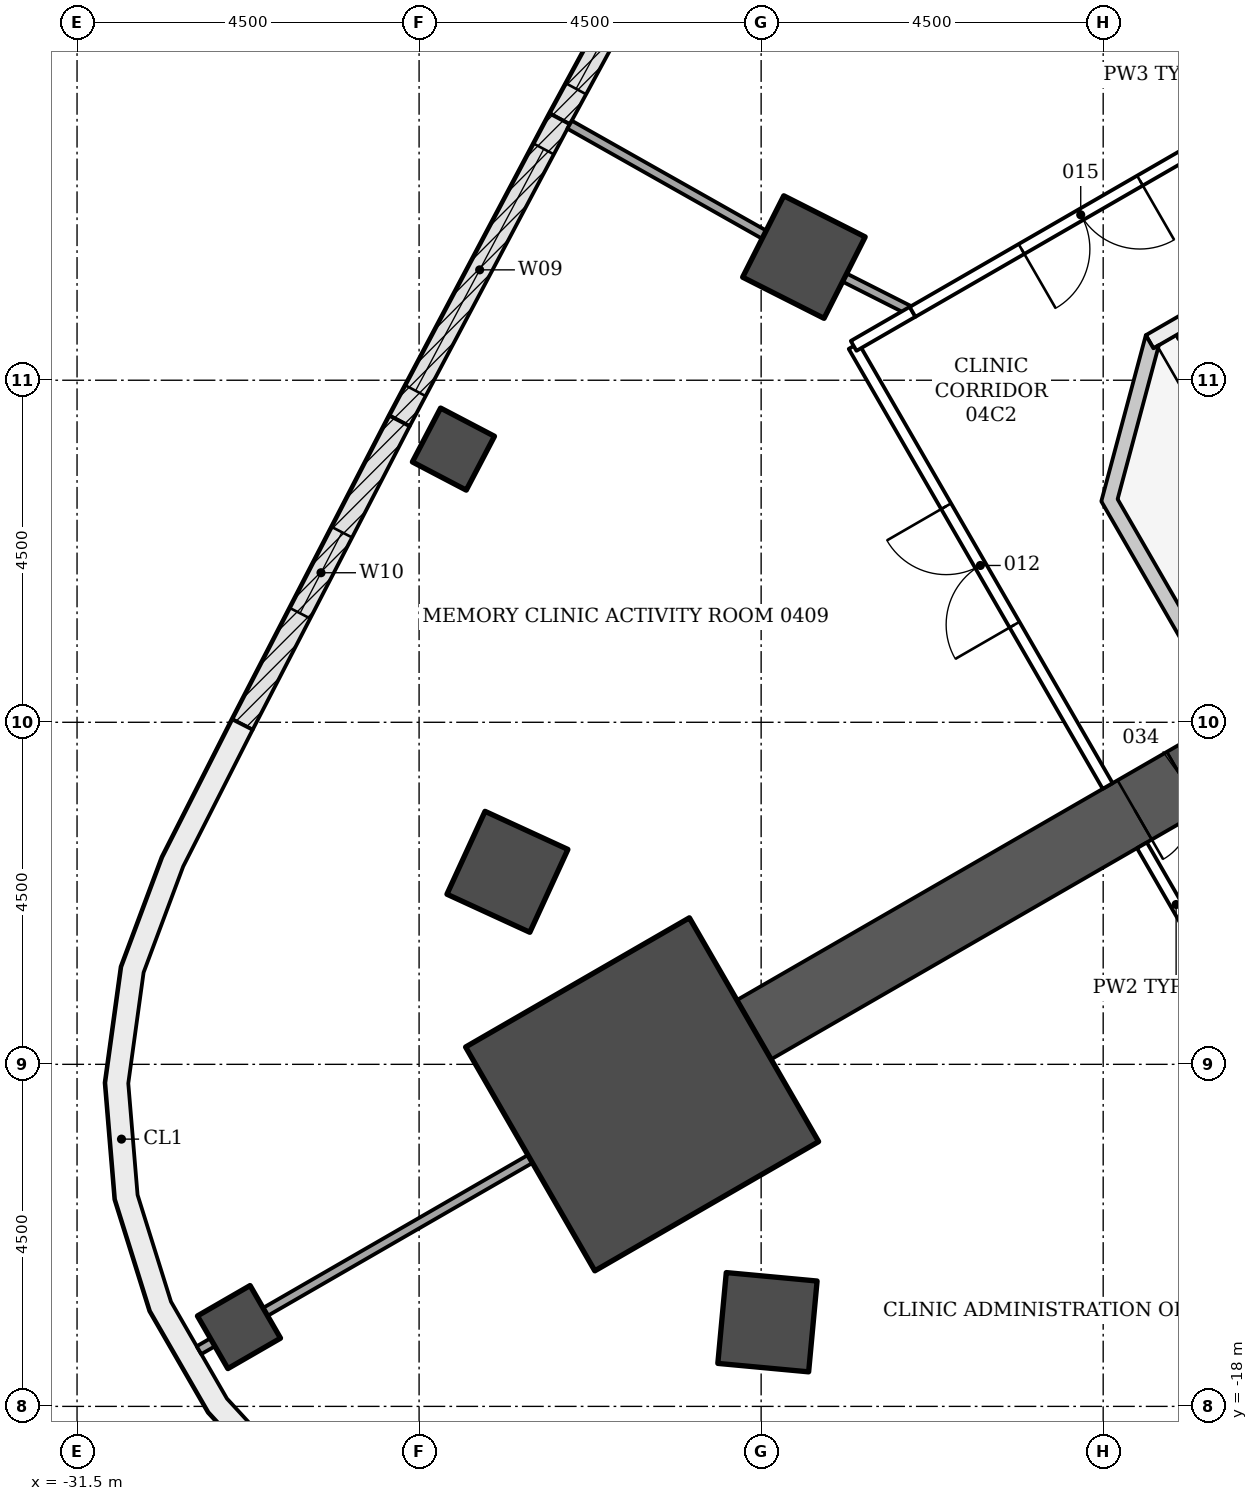
"""IFC4 building model, lengths in metres.
Left out: names, types, materials, properties, quantities, classifications, styles, units other than length and angle.
Written with IfcOpenShell. Run it as: python <this file> out.ifc"""

import sys

from ifc_helpers import new_model, si_unit, direction, frame, frame_2d, origin, origin_2d, place, context, subcontext, project, spatial, polyline, rectangle, outline, extrude, element, fill, save


model = new_model("IFC4")
c1 = context("Model", 3, precision=1e-05, world=origin(), true_north=direction((0.0, 1.0)))
c2 = subcontext(c1, "Body", "Model", "MODEL_VIEW")
j1 = project(units=[si_unit("LENGTHUNIT", "METRE"), si_unit("PLANEANGLEUNIT", "RADIAN")], contexts=[c1])
p1 = place(None, origin())
s1 = spatial("IfcSite", under=j1, at=p1, CompositionType="ELEMENT")
p2 = place(p1, origin())
s2 = spatial("IfcBuilding", under=s1, at=p2, CompositionType="ELEMENT")
p3 = place(p2, frame((0.0, 0.0, 19.5)))
s3 = spatial("IfcBuildingStorey", under=s2, at=p3, CompositionType="ELEMENT", Elevation=19.5)
for number, where, z_axis, x_axis in (
    (1, (-21.937, -2.88, -0.25), (0.0, 0.0, 1.0), (-0.893, 0.451, 0.0)),
    (2, (-25.838, -10.967, -0.25), (0.0, 0.0, 1.0), (-0.909, 0.418, 0.0)),
    (3, (-22.417, -16.893, -0.25), (0.0, 0.0, 1.0), (-0.093, -0.996, 0.0)),
):
    element("IfcColumn", number, at=place(p3, frame(where, z_axis=z_axis, x_axis=x_axis)), inside=s3, PredefinedType="COLUMN", context=c2, shape_type="SweptSolid", body=[
        extrude(rectangle(XDim=1.2, YDim=1.2, at=origin_2d()), origin(), (0.0, 0.0, 1.0), 4.55),
    ])
for number, where, z_axis, x_axis in (
    (4, (-26.548, -5.406, -0.25), (0.0, 0.0, 1.0), (-0.886, 0.464, 0.0)),
    (5, (-29.37, -16.957, -0.25), (0.0, 0.0, 1.0), (-0.866, -0.5, 0.0)),
):
    element("IfcColumn", number, at=place(p3, frame(where, z_axis=z_axis, x_axis=x_axis)), inside=s3, PredefinedType="COLUMN", context=c2, shape_type="SweptSolid", body=[
        extrude(rectangle(XDim=0.8, YDim=0.8, at=origin_2d()), origin(), (0.0, 0.0, 1.0), 4.55),
    ])
p4 = place(p3, frame((-9.922, -5.728, -0.25), z_axis=(0.0, 0.0, 1.0), x_axis=(-0.866028046028, -0.499995423472, 0.0)))
e6 = element("IfcWall", 6, at=p4, inside=s3, PredefinedType="SHEAR", context=c2, shape_type="SweptSolid", body=[
    extrude(rectangle(XDim=14.633, YDim=0.9, at=frame_2d((7.316, 0.0))), origin(), (0.0, 0.0, 1.0), 4.55),
])
p5 = place(p4, frame((7.35, 0.0, 0.25)))
e7 = element("IfcOpeningElement", 7, at=p5, cuts=e6, PredefinedType="OPENING", context=c2, shape_type="SweptSolid", body=[
    extrude(rectangle(XDim=1.5, YDim=2.1, at=frame_2d((0.75, 1.05))), frame((0.0, 0.46, 0.0), z_axis=(0.0, -1.0, 0.0), x_axis=(1.0, 0.0, 0.0)), (0.0, 0.0, 1.0), 0.92),
])
p6 = place(p3, frame((-24.066, -13.895, -0.25), z_axis=(0.0, 0.0, 1.0), x_axis=(-0.866025403784, -0.5, 0.0)))
e8 = element("IfcColumn", 8, at=p6, inside=s3, PredefinedType="COLUMN", context=c2, shape_type="SweptSolid", body=[
    extrude(rectangle(XDim=3.4, YDim=3.4, at=origin_2d()), origin(), (0.0, 0.0, 1.0), 4.55),
])
p7 = place(p3, frame((-25.148, -1.06, 0.0), z_axis=(0.0, 0.0, 1.0), x_axis=(0.477577109439, 0.878589838628, 0.0)))
e9 = element("IfcWall", 9, at=p7, inside=s3, PredefinedType="NOTDEFINED", context=c2, shape_type="SweptSolid", body=[
    extrude(rectangle(XDim=4.496, YDim=0.3, at=frame_2d((2.248, 0.0))), origin(), (0.0, 0.0, 1.0), 4.3),
])
p8 = place(p7, frame((0.448, 0.0, 1.5)))
e10 = element("IfcOpeningElement", 10, at=p8, cuts=e9, PredefinedType="OPENING", context=c2, shape_type="SweptSolid", body=[
    extrude(rectangle(XDim=3.6, YDim=1.8, at=frame_2d((1.8, 0.9))), frame((0.0, 0.16, 0.0), z_axis=(0.0, -1.0, 0.0), x_axis=(1.0, 0.0, 0.0)), (0.0, 0.0, 1.0), 0.32),
])
p9 = place(p3, frame((-27.256, -5.034, 0.0), z_axis=(0.0, 0.0, 1.0), x_axis=(0.468566202388, 0.883428386447, 0.0)))
e11 = element("IfcWall", 11, at=p9, inside=s3, PredefinedType="NOTDEFINED", context=c2, shape_type="SweptSolid", body=[
    extrude(rectangle(XDim=4.496, YDim=0.3, at=frame_2d((2.248, 0.0))), origin(), (0.0, 0.0, 1.0), 4.3),
])
p10 = place(p9, frame((0.448, 0.0, 1.5)))
e12 = element("IfcOpeningElement", 12, at=p10, cuts=e11, PredefinedType="OPENING", context=c2, shape_type="SweptSolid", body=[
    extrude(rectangle(XDim=3.6, YDim=1.8, at=frame_2d((1.8, 0.9))), frame((0.0, 0.16, 0.0), z_axis=(0.0, -1.0, 0.0), x_axis=(1.0, 0.0, 0.0)), (0.0, 0.0, 1.0), 0.32),
])
p11 = place(p3, frame((-29.323, -9.029, 0.0), z_axis=(0.0, 0.0, 1.0), x_axis=(0.459443600121, 0.888206945654, 0.0)))
e13 = element("IfcWall", 13, at=p11, inside=s3, PredefinedType="NOTDEFINED", context=c2, shape_type="SweptSolid", body=[
    extrude(rectangle(XDim=4.496, YDim=0.3, at=frame_2d((2.248, 0.0))), origin(), (0.0, 0.0, 1.0), 4.3),
])
p12 = place(p11, frame((1.648, 0.0, 0.8)))
e14 = element("IfcOpeningElement", 14, at=p12, cuts=e13, PredefinedType="OPENING", context=c2, shape_type="SweptSolid", body=[
    extrude(rectangle(XDim=1.2, YDim=3.0, at=frame_2d((0.6, 1.5))), frame((0.0, 0.16, 0.0), z_axis=(0.0, -1.0, 0.0), x_axis=(1.0, 0.0, 0.0)), (0.0, 0.0, 1.0), 0.32),
])
p13 = place(p3, origin())
e15 = element("IfcWall", 15, at=p13, inside=s3, PredefinedType="NOTDEFINED", context=c2, shape_type="SweptSolid", body=[
    extrude(outline(polyline([(-29.457, -8.962), (-30.379, -10.776), (-30.917, -12.218), (-31.128, -13.742), (-31.0, -15.276), (-30.54, -16.744), (-29.771, -18.077), (-28.729, -19.209), (-27.465, -20.086), (-26.04, -20.666), (-24.522, -20.921), (-22.49, -21.03), (-22.474, -20.73), (-24.489, -20.622), (-25.957, -20.376), (-27.321, -19.821), (-28.531, -18.981), (-29.528, -17.898), (-30.264, -16.623), (-30.704, -15.218), (-30.826, -13.75), (-30.625, -12.292), (-30.104, -10.897), (-29.19, -9.098), (-29.457, -8.962)])), origin(), (0.0, 0.0, 1.0), 4.3),
])
p14 = place(p3, frame((-12.539, -1.194, -0.25), z_axis=(0.0, 0.0, 1.0), x_axis=(-0.866045472092, -0.499965239061, 0.0)))
e16 = element("IfcWall", 16, at=p14, inside=s3, PredefinedType="SHEAR", context=c2, shape_type="SweptSolid", body=[
    extrude(rectangle(XDim=5.6, YDim=0.2, at=frame_2d((2.8, 0.0))), origin(), (0.0, 0.0, 1.0), 4.55),
])
p15 = place(p14, frame((0.45, 0.0, 0.25)))
e17 = element("IfcOpeningElement", 17, at=p15, cuts=e16, PredefinedType="OPENING", context=c2, shape_type="SweptSolid", body=[
    extrude(rectangle(XDim=1.2, YDim=2.1, at=frame_2d((0.6, 1.05))), frame((0.0, 0.11, 0.0), z_axis=(0.0, -1.0, 0.0), x_axis=(1.0, 0.0, 0.0)), (0.0, 0.0, 1.0), 0.22),
])
p16 = place(p3, frame((0.0, 0.0, -0.25)))
e18 = element("IfcWall", 18, at=p16, inside=s3, PredefinedType="SHEAR", context=c2, shape_type="SweptSolid", body=[
    extrude(outline(polyline([(-17.439, -3.907), (-18.025, -6.093), (-16.95, -7.955), (-16.777, -7.855), (-17.81, -6.065), (-17.267, -4.039), (-17.339, -4.081), (-17.339, -4.081), (-17.339, -4.081), (-17.339, -4.081), (-17.339, -4.081), (-17.339, -4.081), (-17.339, -4.081), (-17.339, -4.081), (-17.339, -4.081), (-17.339, -4.081), (-17.339, -4.081), (-17.339, -4.081), (-17.339, -4.081), (-17.339, -4.081), (-17.339, -4.081), (-17.339, -4.081), (-17.339, -4.081), (-17.439, -3.907)])), origin(), (0.0, 0.0, 1.0), 4.55),
])
p17 = place(p3, frame((-16.591, -12.176, 0.0), z_axis=(0.0, 0.0, 1.0), x_axis=(-0.499965372359, 0.866045395139, 0.0)))
e19 = element("IfcWall", 19, at=p17, inside=s3, PredefinedType="PARTITIONING", context=c2, shape_type="SweptSolid", body=[
    extrude(rectangle(XDim=1.798, YDim=0.15, at=frame_2d((0.899, 0.0))), origin(), (0.0, 0.0, 1.0), 3.843),
])
p18 = place(p3, frame((-29.716, -17.157, 0.0), z_axis=(0.0, 0.0, 1.0), x_axis=(-0.865774595023, -0.500434162116, 0.0)))
e20 = element("IfcWall", 20, at=p18, inside=s3, PredefinedType="PARTITIONING", context=c2, shape_type="SweptSolid", body=[
    extrude(rectangle(XDim=0.208, YDim=0.12, at=frame_2d((0.104, 0.0))), origin(), (0.0, 0.0, 1.0), 4.3),
])
p19 = place(p3, frame((-25.538, -14.745, 0.0), z_axis=(0.0, 0.0, 1.0), x_axis=(-0.866027971625, -0.499995552344, 0.0)))
e21 = element("IfcWall", 21, at=p19, inside=s3, PredefinedType="PARTITIONING", context=c2, shape_type="SweptSolid", body=[
    extrude(rectangle(XDim=4.024, YDim=0.12, at=frame_2d((2.012, 0.0))), origin(), (0.0, 0.0, 1.0), 3.767),
])
p20 = place(p3, frame((-17.941, -9.838, 0.0), z_axis=(0.0, 0.0, 1.0), x_axis=(-0.500048140185, 0.865997608252, 0.0)))
e22 = element("IfcWall", 22, at=p20, inside=s3, PredefinedType="PARTITIONING", context=c2, shape_type="SweptSolid", body=[
    extrude(rectangle(XDim=6.683, YDim=0.15, at=frame_2d((3.342, 0.0))), origin(), (0.0, 0.0, 1.0), 3.843),
])
p21 = place(p20, frame((2.45, 0.0, 0.0)))
e23 = element("IfcOpeningElement", 23, at=p21, cuts=e22, PredefinedType="OPENING", context=c2, shape_type="SweptSolid", body=[
    extrude(rectangle(XDim=1.8, YDim=2.1, at=frame_2d((0.9, 1.05))), frame((0.0, 0.085, 0.0), z_axis=(0.0, -1.0, 0.0), x_axis=(1.0, 0.0, 0.0)), (0.0, 0.0, 1.0), 0.17),
])
p22 = place(p3, frame((-21.283, -4.048, 0.0), z_axis=(0.0, 0.0, 1.0), x_axis=(0.865804825377, 0.500381858538, 0.0)))
e24 = element("IfcWall", 24, at=p22, inside=s3, PredefinedType="PARTITIONING", context=c2, shape_type="SweptSolid", body=[
    extrude(rectangle(XDim=0.897, YDim=0.15, at=frame_2d((0.449, 0.0))), origin(), (0.0, 0.0, 1.0), 3.894),
])
p23 = place(p3, frame((-22.461, -2.584, 0.0), z_axis=(0.0, 0.0, 1.0), x_axis=(-0.870620069476, 0.491955988505, 0.0)))
e25 = element("IfcWall", 25, at=p23, inside=s3, PredefinedType="PARTITIONING", context=c2, shape_type="SweptSolid", body=[
    extrude(rectangle(XDim=2.939, YDim=0.12, at=frame_2d((1.47, 0.0))), origin(), (0.0, 0.0, 1.0), 3.683),
])
p24 = place(p3, frame((-20.509, -3.601, 0.0), z_axis=(0.0, 0.0, 1.0), x_axis=(-0.892316605155, 0.451410097544, 0.0)))
e26 = element("IfcWall", 26, at=p24, inside=s3, PredefinedType="PARTITIONING", context=c2, shape_type="SweptSolid", body=[
    extrude(rectangle(XDim=1.0, YDim=0.12, at=frame_2d((0.5, 0.0))), origin(), (0.0, 0.0, 1.0), 3.894),
])
p25 = place(p3, frame((-16.087, -1.049, 0.0), z_axis=(0.0, 0.0, 1.0), x_axis=(-0.866071706002, -0.49991979363, 0.0)))
e27 = element("IfcWall", 27, at=p25, inside=s3, PredefinedType="PARTITIONING", context=c2, shape_type="SweptSolid", body=[
    extrude(rectangle(XDim=5.105, YDim=0.15, at=frame_2d((2.552, 0.0))), origin(), (0.0, 0.0, 1.0), 3.894),
])
p26 = place(p25, frame((1.65, 0.0, 0.0)))
e28 = element("IfcOpeningElement", 28, at=p26, cuts=e27, PredefinedType="OPENING", context=c2, shape_type="SweptSolid", body=[
    extrude(rectangle(XDim=1.8, YDim=2.1, at=frame_2d((0.9, 1.05))), frame((0.0, 0.085, 0.0), z_axis=(0.0, -1.0, 0.0), x_axis=(1.0, 0.0, 0.0)), (0.0, 0.0, 1.0), 0.17),
])
p27 = place(p8, origin())
e29 = element("IfcWindow", 29, at=p27, inside=s3, PartitioningType="SINGLE_PANEL", PredefinedType="WINDOW", context=c2, shape_type="SweptSolid", body=[
    extrude(rectangle(XDim=3.6, YDim=1.8, at=frame_2d((1.8, 0.9))), frame((0.0, 0.03, 0.0), z_axis=(0.0, -1.0, 0.0), x_axis=(1.0, 0.0, 0.0)), (0.0, 0.0, 1.0), 0.06),
])
fill(e10, e29)
p28 = place(p10, origin())
e30 = element("IfcWindow", 30, at=p28, inside=s3, PartitioningType="SINGLE_PANEL", PredefinedType="WINDOW", context=c2, shape_type="SweptSolid", body=[
    extrude(rectangle(XDim=3.6, YDim=1.8, at=frame_2d((1.8, 0.9))), frame((0.0, 0.03, 0.0), z_axis=(0.0, -1.0, 0.0), x_axis=(1.0, 0.0, 0.0)), (0.0, 0.0, 1.0), 0.06),
])
fill(e12, e30)
p29 = place(p12, origin())
e31 = element("IfcWindow", 31, at=p29, inside=s3, PartitioningType="SINGLE_PANEL", PredefinedType="WINDOW", context=c2, shape_type="SweptSolid", body=[
    extrude(rectangle(XDim=1.2, YDim=3.0, at=frame_2d((0.6, 1.5))), frame((0.0, 0.03, 0.0), z_axis=(0.0, -1.0, 0.0), x_axis=(1.0, 0.0, 0.0)), (0.0, 0.0, 1.0), 0.06),
])
fill(e14, e31)
p30 = place(p21, origin())
e32 = element("IfcDoor", 32, at=p30, inside=s3, OperationType="DOUBLE_DOOR_SINGLE_SWING", PredefinedType="DOOR", context=c2, shape_type="SweptSolid", body=[
    extrude(rectangle(XDim=1.8, YDim=2.1, at=frame_2d((0.9, 1.05))), frame((0.0, 0.025, 0.0), z_axis=(0.0, -1.0, 0.0), x_axis=(1.0, 0.0, 0.0)), (0.0, 0.0, 1.0), 0.05),
])
fill(e23, e32)
p31 = place(p26, origin())
e33 = element("IfcDoor", 33, at=p31, inside=s3, OperationType="DOUBLE_DOOR_SINGLE_SWING", PredefinedType="DOOR", context=c2, shape_type="SweptSolid", body=[
    extrude(rectangle(XDim=1.8, YDim=2.1, at=frame_2d((0.9, 1.05))), frame((0.0, 0.025, 0.0), z_axis=(0.0, -1.0, 0.0), x_axis=(1.0, 0.0, 0.0)), (0.0, 0.0, 1.0), 0.05),
])
fill(e28, e33)
p32 = place(p5, origin())
e34 = element("IfcDoor", 34, at=p32, inside=s3, OperationType="DOUBLE_DOOR_SINGLE_SWING", PredefinedType="DOOR", context=c2, shape_type="SweptSolid", body=[
    extrude(rectangle(XDim=1.5, YDim=2.1, at=frame_2d((0.75, 1.05))), frame((0.0, 0.025, 0.0), z_axis=(0.0, -1.0, 0.0), x_axis=(1.0, 0.0, 0.0)), (0.0, 0.0, 1.0), 0.05),
])
fill(e7, e34)
save(model, sys.argv[1])
